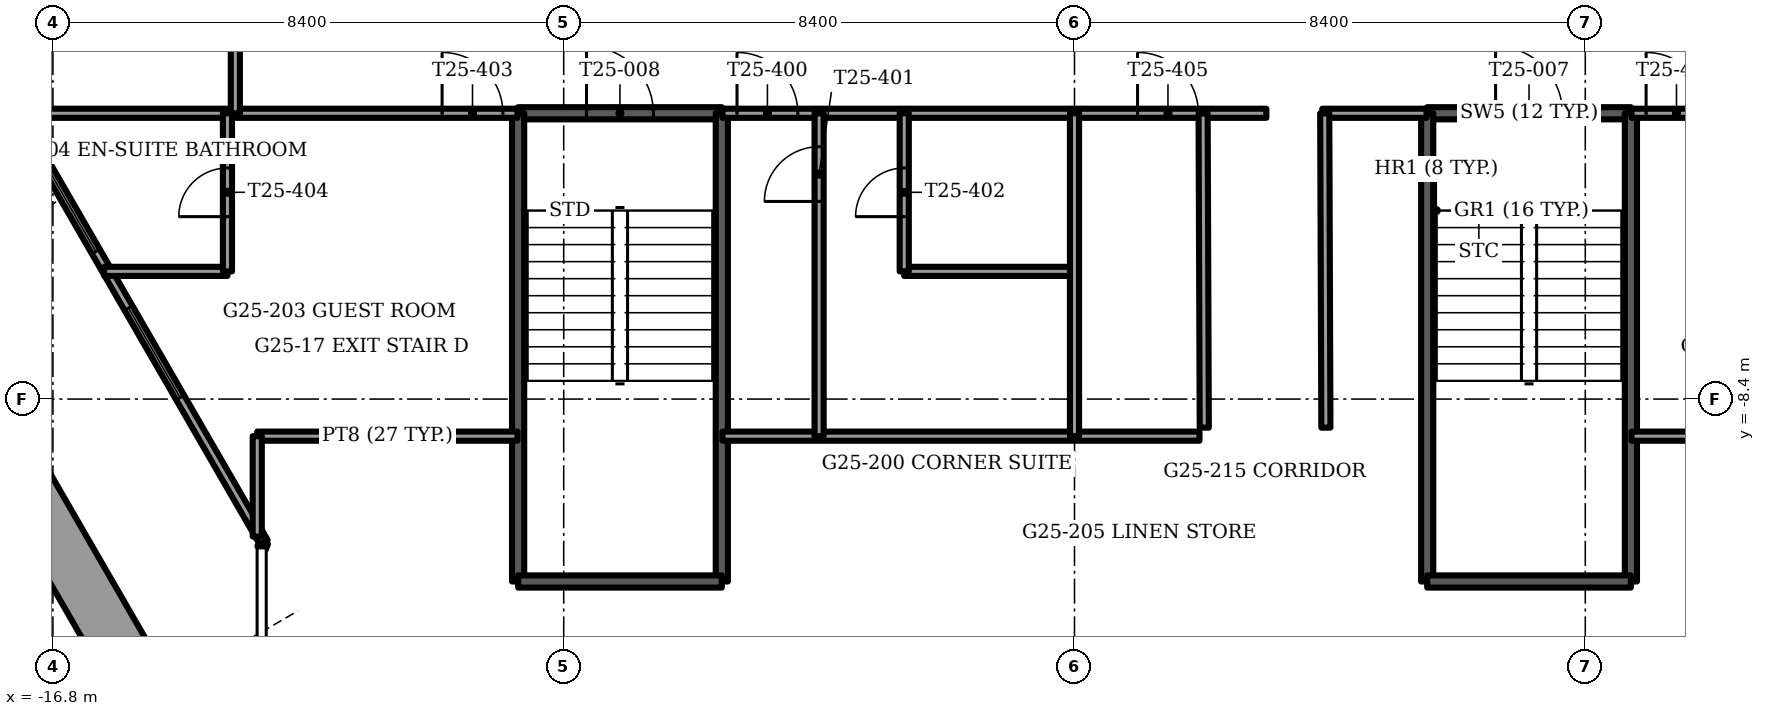
"""IFC4 building model, lengths in metres.
Left out: names, types, materials, properties, quantities, classifications, styles, units other than length and angle.
Written with IfcOpenShell. Run it as: python <this file> out.ifc"""

import sys

from ifc_helpers import new_model, si_unit, direction, frame, frame_2d, origin, place, context, subcontext, project, spatial, rectangle, extrude, element, fill, save


model = new_model("IFC4")
c1 = context("Model", 3, precision=1e-05, world=origin(), true_north=direction((0.0, 1.0)))
c2 = subcontext(c1, "Body", "Model", "MODEL_VIEW")
j1 = project(units=[si_unit("LENGTHUNIT", "METRE"), si_unit("PLANEANGLEUNIT", "RADIAN")], contexts=[c1])
p1 = place(None, origin())
s1 = spatial("IfcSite", under=j1, at=p1, CompositionType="ELEMENT")
p2 = place(p1, origin())
s2 = spatial("IfcBuilding", under=s1, at=p2, CompositionType="ELEMENT")
p3 = place(p2, frame((0.0, 0.0, 100.5)))
s3 = spatial("IfcBuildingStorey", under=s2, at=p3, CompositionType="ELEMENT", Elevation=100.5)
p4 = place(p3, frame((-18.859, -7.035, 0.0), z_axis=(0.0, 0.0, 1.0), x_axis=(0.499999023957, -0.866025967302, 0.0)))
e1 = element("IfcWall", 1, at=p4, inside=s3, PredefinedType="PARAPET", context=c2, shape_type="SweptSolid", body=[
    extrude(rectangle(XDim=6.673, YDim=0.9, at=frame_2d((3.337, 0.0))), origin(), (0.0, 0.0, 1.0), 1.1),
])
p5 = place(p3, frame((-19.047, -0.86, 0.0), z_axis=(0.0, 0.0, 1.0), x_axis=(0.499999897272, -0.866025463095, 0.0)))
e2 = element("IfcWall", 2, at=p5, inside=s3, PredefinedType="SOLIDWALL", context=c2, shape_type="SweptSolid", body=[
    extrude(rectangle(XDim=11.426, YDim=0.15, at=frame_2d((5.713, 0.0))), origin(), (0.0, 0.0, 1.0), 3.45),
])
p6 = place(p5, frame((4.406, 0.0, 0.15)))
e3 = element("IfcOpeningElement", 3, at=p6, cuts=e2, PredefinedType="OPENING", context=c2, shape_type="SweptSolid", body=[
    extrude(rectangle(XDim=1.5, YDim=2.2, at=frame_2d((0.75, 1.1))), frame((0.0, 0.075, 0.0), z_axis=(0.0, -1.0, 0.0), x_axis=(1.0, 0.0, 0.0)), (0.0, 0.0, 1.0), 0.15),
])
p7 = place(p5, frame((6.979, 0.0, 0.15)))
e4 = element("IfcOpeningElement", 4, at=p7, cuts=e2, PredefinedType="OPENING", context=c2, shape_type="SweptSolid", body=[
    extrude(rectangle(XDim=1.7, YDim=2.2, at=frame_2d((0.85, 1.1))), frame((0.0, 0.075, 0.0), z_axis=(0.0, -1.0, 0.0), x_axis=(1.0, 0.0, 0.0)), (0.0, 0.0, 1.0), 0.15),
])
p8 = place(p3, frame((-13.334, -10.755, 0.0), z_axis=(0.0, 0.0, 1.0), x_axis=(-0.337751931921, -0.941235163221, 0.0)))
e5 = element("IfcWall", 5, at=p8, inside=s3, PredefinedType="SOLIDWALL", context=c2, shape_type="SweptSolid", body=[
    extrude(rectangle(XDim=0.098, YDim=0.15, at=frame_2d((0.049, 0.0))), origin(), (0.0, 0.0, 1.0), 3.45),
])
p9 = place(p3, frame((5.8, -3.7, -0.3), z_axis=(0.0, 0.0, 1.0), x_axis=(1.0, 0.0, 0.0)))
e6 = element("IfcWall", 6, at=p9, inside=s3, PredefinedType="SOLIDWALL", context=c2, shape_type="SweptSolid", body=[
    extrude(rectangle(XDim=3.35, YDim=0.2, at=frame_2d((1.675, 0.0))), origin(), (0.0, 0.0, 1.0), 3.75),
])
p10 = place(p9, frame((1.125, 0.0, 0.0)))
e7 = element("IfcOpeningElement", 7, at=p10, cuts=e6, PredefinedType="OPENING", context=c2, shape_type="SweptSolid", body=[
    extrude(rectangle(XDim=1.1, YDim=2.1, at=frame_2d((0.55, 1.05))), frame((0.0, 0.1, 0.0), z_axis=(0.0, -1.0, 0.0), x_axis=(1.0, 0.0, 0.0)), (0.0, 0.0, 1.0), 0.2),
])
for number, where, z_axis, x_axis in (
    (8, (5.8, -3.7, -0.3), (0.0, 0.0, 1.0), (0.0, -1.0, 0.0)),
    (9, (9.15, -3.7, -0.3), (0.0, 0.0, 1.0), (0.0, -1.0, 0.0)),
):
    element("IfcWall", number, at=place(p3, frame(where, z_axis=z_axis, x_axis=x_axis)), inside=s3, PredefinedType="SOLIDWALL", context=c2, shape_type="SweptSolid", body=[
        extrude(rectangle(XDim=7.7, YDim=0.2, at=frame_2d((3.85, 0.0))), origin(), (0.0, 0.0, 1.0), 3.75),
    ])
p11 = place(p3, frame((5.8, -11.4, -0.3), z_axis=(0.0, 0.0, 1.0), x_axis=(1.0, 0.0, 0.0)))
e10 = element("IfcWall", 10, at=p11, inside=s3, PredefinedType="SOLIDWALL", context=c2, shape_type="SweptSolid", body=[
    extrude(rectangle(XDim=3.35, YDim=0.2, at=frame_2d((1.675, 0.0))), origin(), (0.0, 0.0, 1.0), 3.75),
])
p12 = place(p3, frame((-9.15, -3.7, -0.3), z_axis=(0.0, 0.0, 1.0), x_axis=(1.0, 0.0, 0.0)))
e11 = element("IfcWall", 11, at=p12, inside=s3, PredefinedType="SOLIDWALL", context=c2, shape_type="SweptSolid", body=[
    extrude(rectangle(XDim=3.35, YDim=0.2, at=frame_2d((1.675, 0.0))), origin(), (0.0, 0.0, 1.0), 3.75),
])
p13 = place(p12, frame((1.125, 0.0, 0.0)))
e12 = element("IfcOpeningElement", 12, at=p13, cuts=e11, PredefinedType="OPENING", context=c2, shape_type="SweptSolid", body=[
    extrude(rectangle(XDim=1.1, YDim=2.1, at=frame_2d((0.55, 1.05))), frame((0.0, 0.1, 0.0), z_axis=(0.0, -1.0, 0.0), x_axis=(1.0, 0.0, 0.0)), (0.0, 0.0, 1.0), 0.2),
])
for number, where, z_axis, x_axis in (
    (13, (-9.15, -3.7, -0.3), (0.0, 0.0, 1.0), (0.0, -1.0, 0.0)),
    (14, (-5.8, -3.7, -0.3), (0.0, 0.0, 1.0), (0.0, -1.0, 0.0)),
):
    element("IfcWall", number, at=place(p3, frame(where, z_axis=z_axis, x_axis=x_axis)), inside=s3, PredefinedType="SOLIDWALL", context=c2, shape_type="SweptSolid", body=[
        extrude(rectangle(XDim=7.7, YDim=0.2, at=frame_2d((3.85, 0.0))), origin(), (0.0, 0.0, 1.0), 3.75),
    ])
p14 = place(p3, frame((-9.15, -11.4, -0.3), z_axis=(0.0, 0.0, 1.0), x_axis=(1.0, 0.0, 0.0)))
e15 = element("IfcWall", 15, at=p14, inside=s3, PredefinedType="SOLIDWALL", context=c2, shape_type="SweptSolid", body=[
    extrude(rectangle(XDim=3.35, YDim=0.2, at=frame_2d((1.675, 0.0))), origin(), (0.0, 0.0, 1.0), 3.75),
])
p15 = place(p3, frame((-13.44, -9.01, 0.0), z_axis=(0.0, 0.0, 1.0), x_axis=(1.0, 0.0, 0.0)))
e16 = element("IfcWall", 16, at=p15, inside=s3, PredefinedType="PARTITIONING", context=c2, shape_type="SweptSolid", body=[
    extrude(rectangle(XDim=4.28, YDim=0.15, at=frame_2d((2.14, 0.0))), origin(), (0.0, 0.0, 1.0), 3.45),
])
p16 = place(p3, frame((-5.79, -9.01, 0.0), z_axis=(0.0, 0.0, 1.0), x_axis=(1.0, 0.0, 0.0)))
e17 = element("IfcWall", 17, at=p16, inside=s3, PredefinedType="PARTITIONING", context=c2, shape_type="SweptSolid", body=[
    extrude(rectangle(XDim=7.845, YDim=0.15, at=frame_2d((3.922, 0.0))), origin(), (0.0, 0.0, 1.0), 3.45),
])
p17 = place(p3, frame((9.16, -9.01, 0.0), z_axis=(0.0, 0.0, 1.0), x_axis=(1.0, 0.0, 0.0)))
e18 = element("IfcWall", 18, at=p17, inside=s3, PredefinedType="PARTITIONING", context=c2, shape_type="SweptSolid", body=[
    extrude(rectangle(XDim=4.28, YDim=0.15, at=frame_2d((2.14, 0.0))), origin(), (0.0, 0.0, 1.0), 3.45),
])
p18 = place(p3, frame((-15.958, -6.3, 0.0), z_axis=(0.0, 0.0, 1.0), x_axis=(1.0, 0.0, 0.0)))
e19 = element("IfcWall", 19, at=p18, inside=s3, PredefinedType="PARTITIONING", context=c2, shape_type="SweptSolid", body=[
    extrude(rectangle(XDim=2.028, YDim=0.15, at=frame_2d((1.014, 0.0))), origin(), (0.0, 0.0, 1.0), 3.45),
])
p19 = place(p3, frame((-2.8, -6.3, 0.0), z_axis=(0.0, 0.0, 1.0), x_axis=(1.0, 0.0, 0.0)))
e20 = element("IfcWall", 20, at=p19, inside=s3, PredefinedType="PARTITIONING", context=c2, shape_type="SweptSolid", body=[
    extrude(rectangle(XDim=2.8, YDim=0.15, at=frame_2d((1.4, 0.0))), origin(), (0.0, 0.0, 1.0), 3.45),
])
p20 = place(p3, frame((-17.459, -3.7, 0.0), z_axis=(0.0, 0.0, 1.0), x_axis=(1.0, 0.0, 0.0)))
e21 = element("IfcWall", 21, at=p20, inside=s3, PredefinedType="PARTITIONING", context=c2, shape_type="SweptSolid", body=[
    extrude(rectangle(XDim=8.299, YDim=0.15, at=frame_2d((4.149, 0.0))), origin(), (0.0, 0.0, 1.0), 3.45),
])
p21 = place(p20, frame((7.059, 0.0, 0.0)))
e22 = element("IfcOpeningElement", 22, at=p21, cuts=e21, PredefinedType="OPENING", context=c2, shape_type="SweptSolid", body=[
    extrude(rectangle(XDim=1.0, YDim=2.1, at=frame_2d((0.5, 1.05))), frame((0.0, 0.075, 0.0), z_axis=(0.0, -1.0, 0.0), x_axis=(1.0, 0.0, 0.0)), (0.0, 0.0, 1.0), 0.15),
])
p22 = place(p3, frame((-5.79, -3.7, 0.0), z_axis=(0.0, 0.0, 1.0), x_axis=(1.0, 0.0, 0.0)))
e23 = element("IfcWall", 23, at=p22, inside=s3, PredefinedType="PARTITIONING", context=c2, shape_type="SweptSolid", body=[
    extrude(rectangle(XDim=8.945, YDim=0.15, at=frame_2d((4.473, 0.0))), origin(), (0.0, 0.0, 1.0), 3.45),
])
p23 = place(p22, frame((0.24, 0.0, 0.0)))
e24 = element("IfcOpeningElement", 24, at=p23, cuts=e23, PredefinedType="OPENING", context=c2, shape_type="SweptSolid", body=[
    extrude(rectangle(XDim=1.0, YDim=2.1, at=frame_2d((0.5, 1.05))), frame((0.0, 0.075, 0.0), z_axis=(0.0, -1.0, 0.0), x_axis=(1.0, 0.0, 0.0)), (0.0, 0.0, 1.0), 0.15),
])
p24 = place(p22, frame((6.827, 0.0, 0.0)))
e25 = element("IfcOpeningElement", 25, at=p24, cuts=e23, PredefinedType="OPENING", context=c2, shape_type="SweptSolid", body=[
    extrude(rectangle(XDim=1.0, YDim=2.1, at=frame_2d((0.5, 1.05))), frame((0.0, 0.075, 0.0), z_axis=(0.0, -1.0, 0.0), x_axis=(1.0, 0.0, 0.0)), (0.0, 0.0, 1.0), 0.15),
])
p25 = place(p3, frame((4.075, -3.7, 0.0), z_axis=(0.0, 0.0, 1.0), x_axis=(1.0, 0.0, 0.0)))
e26 = element("IfcWall", 26, at=p25, inside=s3, PredefinedType="PARTITIONING", context=c2, shape_type="SweptSolid", body=[
    extrude(rectangle(XDim=1.715, YDim=0.15, at=frame_2d((0.857, 0.0))), origin(), (0.0, 0.0, 1.0), 3.45),
])
p26 = place(p3, frame((9.16, -3.7, 0.0), z_axis=(0.0, 0.0, 1.0), x_axis=(1.0, 0.0, 0.0)))
e27 = element("IfcWall", 27, at=p26, inside=s3, PredefinedType="PARTITIONING", context=c2, shape_type="SweptSolid", body=[
    extrude(rectangle(XDim=8.299, YDim=0.15, at=frame_2d((4.149, 0.0))), origin(), (0.0, 0.0, 1.0), 3.45),
])
p27 = place(p26, frame((0.24, 0.0, 0.0)))
e28 = element("IfcOpeningElement", 28, at=p27, cuts=e27, PredefinedType="OPENING", context=c2, shape_type="SweptSolid", body=[
    extrude(rectangle(XDim=1.0, YDim=2.1, at=frame_2d((0.5, 1.05))), frame((0.0, 0.075, 0.0), z_axis=(0.0, -1.0, 0.0), x_axis=(1.0, 0.0, 0.0)), (0.0, 0.0, 1.0), 0.15),
])
p28 = place(p3, frame((0.0, -9.01, 0.0), z_axis=(0.0, 0.0, 1.0), x_axis=(0.0, 1.0, 0.0)))
e29 = element("IfcWall", 29, at=p28, inside=s3, PredefinedType="PARTITIONING", context=c2, shape_type="SweptSolid", body=[
    extrude(rectangle(XDim=5.31, YDim=0.15, at=frame_2d((2.655, 0.0))), origin(), (0.0, 0.0, 1.0), 3.45),
])
p29 = place(p3, frame((-2.8, -6.3, 0.0), z_axis=(0.0, 0.0, 1.0), x_axis=(0.0, 1.0, 0.0)))
e30 = element("IfcWall", 30, at=p29, inside=s3, PredefinedType="PARTITIONING", context=c2, shape_type="SweptSolid", body=[
    extrude(rectangle(XDim=2.6, YDim=0.15, at=frame_2d((1.3, 0.0))), origin(), (0.0, 0.0, 1.0), 3.45),
])
p30 = place(p29, frame((0.9, 0.0, 0.0)))
e31 = element("IfcOpeningElement", 31, at=p30, cuts=e30, PredefinedType="OPENING", context=c2, shape_type="SweptSolid", body=[
    extrude(rectangle(XDim=0.8, YDim=2.1, at=frame_2d((0.4, 1.05))), frame((0.0, 0.075, 0.0), z_axis=(0.0, -1.0, 0.0), x_axis=(1.0, 0.0, 0.0)), (0.0, 0.0, 1.0), 0.15),
])
p31 = place(p3, frame((-4.2, -9.01, 0.0), z_axis=(0.0, 0.0, 1.0), x_axis=(0.0, 1.0, 0.0)))
e32 = element("IfcWall", 32, at=p31, inside=s3, PredefinedType="PARTITIONING", context=c2, shape_type="SweptSolid", body=[
    extrude(rectangle(XDim=5.31, YDim=0.15, at=frame_2d((2.655, 0.0))), origin(), (0.0, 0.0, 1.0), 3.45),
])
p32 = place(p31, frame((3.86, 0.0, 0.0)))
e33 = element("IfcOpeningElement", 33, at=p32, cuts=e32, PredefinedType="OPENING", context=c2, shape_type="SweptSolid", body=[
    extrude(rectangle(XDim=0.9, YDim=2.1, at=frame_2d((0.45, 1.05))), frame((0.0, 0.075, 0.0), z_axis=(0.0, -1.0, 0.0), x_axis=(1.0, 0.0, 0.0)), (0.0, 0.0, 1.0), 0.15),
])
p33 = place(p3, frame((-13.44, -10.661, 0.0), z_axis=(0.0, 0.0, 1.0), x_axis=(0.0, 1.0, 0.0)))
e34 = element("IfcWall", 34, at=p33, inside=s3, PredefinedType="PARTITIONING", context=c2, shape_type="SweptSolid", body=[
    extrude(rectangle(XDim=1.651, YDim=0.15, at=frame_2d((0.825, 0.0))), origin(), (0.0, 0.0, 1.0), 3.45),
])
p34 = place(p3, frame((-13.8, -3.7, 0.0), z_axis=(0.0, 0.0, 1.0), x_axis=(0.0, 1.0, 0.0)))
e35 = element("IfcWall", 35, at=p34, inside=s3, PredefinedType="PARTITIONING", context=c2, shape_type="SweptSolid", body=[
    extrude(rectangle(XDim=13.083, YDim=0.15, at=frame_2d((6.542, 0.0))), origin(), (0.0, 0.0, 1.0), 3.45),
])
p35 = place(p34, frame((2.65, 0.0, 0.0)))
e36 = element("IfcOpeningElement", 36, at=p35, cuts=e35, PredefinedType="OPENING", context=c2, shape_type="SweptSolid", body=[
    extrude(rectangle(XDim=1.0, YDim=2.1, at=frame_2d((0.5, 1.05))), frame((0.0, 0.075, 0.0), z_axis=(0.0, -1.0, 0.0), x_axis=(1.0, 0.0, 0.0)), (0.0, 0.0, 1.0), 0.15),
])
p36 = place(p34, frame((9.07, 0.0, 0.0)))
e37 = element("IfcOpeningElement", 37, at=p36, cuts=e35, PredefinedType="OPENING", context=c2, shape_type="SweptSolid", body=[
    extrude(rectangle(XDim=1.0, YDim=2.1, at=frame_2d((0.5, 1.05))), frame((0.0, 0.075, 0.0), z_axis=(0.0, -1.0, 0.0), x_axis=(1.0, 0.0, 0.0)), (0.0, 0.0, 1.0), 0.15),
])
p37 = place(p3, frame((-13.93, -6.3, 0.0), z_axis=(0.0, 0.0, 1.0), x_axis=(0.0, 1.0, 0.0)))
e38 = element("IfcWall", 38, at=p37, inside=s3, PredefinedType="PARTITIONING", context=c2, shape_type="SweptSolid", body=[
    extrude(rectangle(XDim=2.6, YDim=0.15, at=frame_2d((1.3, 0.0))), origin(), (0.0, 0.0, 1.0), 3.45),
])
p38 = place(p37, frame((0.9, 0.0, 0.0)))
e39 = element("IfcOpeningElement", 39, at=p38, cuts=e38, PredefinedType="OPENING", context=c2, shape_type="SweptSolid", body=[
    extrude(rectangle(XDim=0.8, YDim=2.1, at=frame_2d((0.4, 1.05))), frame((0.0, 0.075, 0.0), z_axis=(0.0, -1.0, 0.0), x_axis=(1.0, 0.0, 0.0)), (0.0, 0.0, 1.0), 0.15),
])
p39 = place(p3, frame((4.134, -8.87, 0.0), z_axis=(0.0, 0.0, 1.0), x_axis=(-0.003683216269, 0.999993216936, 0.0)))
e40 = element("IfcWall", 40, at=p39, inside=s3, PredefinedType="PARTITIONING", context=c2, shape_type="SweptSolid", body=[
    extrude(rectangle(XDim=5.17, YDim=0.15, at=frame_2d((2.585, 0.0))), origin(), (0.0, 0.0, 1.0), 3.45),
])
p40 = place(p3, frame((2.134, -8.87, 0.0), z_axis=(0.0, 0.0, 1.0), x_axis=(-0.003686872276, 0.999993203463, 0.0)))
e41 = element("IfcWall", 41, at=p40, inside=s3, PredefinedType="PARTITIONING", context=c2, shape_type="SweptSolid", body=[
    extrude(rectangle(XDim=5.165, YDim=0.15, at=frame_2d((2.583, 0.0))), origin(), (0.0, 0.0, 1.0), 3.45),
])
p41 = place(p6, origin())
e42 = element("IfcWindow", 42, at=p41, inside=s3, PartitioningType="SINGLE_PANEL", PredefinedType="WINDOW", context=c2, shape_type="SweptSolid", body=[
    extrude(rectangle(XDim=1.5, YDim=2.2, at=frame_2d((0.75, 1.1))), frame((0.0, 0.03, 0.0), z_axis=(0.0, -1.0, 0.0), x_axis=(1.0, 0.0, 0.0)), (0.0, 0.0, 1.0), 0.06),
])
fill(e3, e42)
p42 = place(p7, origin())
e43 = element("IfcWindow", 43, at=p42, inside=s3, PartitioningType="SINGLE_PANEL", PredefinedType="WINDOW", context=c2, shape_type="SweptSolid", body=[
    extrude(rectangle(XDim=1.7, YDim=2.2, at=frame_2d((0.85, 1.1))), frame((0.0, 0.03, 0.0), z_axis=(0.0, -1.0, 0.0), x_axis=(1.0, 0.0, 0.0)), (0.0, 0.0, 1.0), 0.06),
])
fill(e4, e43)
p43 = place(p10, origin())
e44 = element("IfcDoor", 44, at=p43, inside=s3, OperationType="SINGLE_SWING_LEFT", PredefinedType="DOOR", context=c2, shape_type="SweptSolid", body=[
    extrude(rectangle(XDim=1.1, YDim=2.1, at=frame_2d((0.55, 1.05))), frame((0.0, 0.025, 0.0), z_axis=(0.0, -1.0, 0.0), x_axis=(1.0, 0.0, 0.0)), (0.0, 0.0, 1.0), 0.05),
])
fill(e7, e44)
p44 = place(p13, origin())
e45 = element("IfcDoor", 45, at=p44, inside=s3, OperationType="SINGLE_SWING_LEFT", PredefinedType="DOOR", context=c2, shape_type="SweptSolid", body=[
    extrude(rectangle(XDim=1.1, YDim=2.1, at=frame_2d((0.55, 1.05))), frame((0.0, 0.025, 0.0), z_axis=(0.0, -1.0, 0.0), x_axis=(1.0, 0.0, 0.0)), (0.0, 0.0, 1.0), 0.05),
])
fill(e12, e45)
p45 = place(p23, origin())
e46 = element("IfcDoor", 46, at=p45, inside=s3, OperationType="SINGLE_SWING_LEFT", PredefinedType="DOOR", context=c2, shape_type="SweptSolid", body=[
    extrude(rectangle(XDim=1.0, YDim=2.1, at=frame_2d((0.5, 1.05))), frame((0.0, 0.025, 0.0), z_axis=(0.0, -1.0, 0.0), x_axis=(1.0, 0.0, 0.0)), (0.0, 0.0, 1.0), 0.05),
])
fill(e24, e46)
p46 = place(p32, origin())
e47 = element("IfcDoor", 47, at=p46, inside=s3, OperationType="SINGLE_SWING_RIGHT", PredefinedType="DOOR", context=c2, shape_type="SweptSolid", body=[
    extrude(rectangle(XDim=0.9, YDim=2.1, at=frame_2d((0.45, 1.05))), frame((0.0, 0.025, 0.0), z_axis=(0.0, -1.0, 0.0), x_axis=(1.0, 0.0, 0.0)), (0.0, 0.0, 1.0), 0.05),
])
fill(e33, e47)
p47 = place(p30, origin())
e48 = element("IfcDoor", 48, at=p47, inside=s3, OperationType="SINGLE_SWING_RIGHT", PredefinedType="DOOR", context=c2, shape_type="SweptSolid", body=[
    extrude(rectangle(XDim=0.8, YDim=2.1, at=frame_2d((0.4, 1.05))), frame((0.0, 0.025, 0.0), z_axis=(0.0, -1.0, 0.0), x_axis=(1.0, 0.0, 0.0)), (0.0, 0.0, 1.0), 0.05),
])
fill(e31, e48)
p48 = place(p21, origin())
e49 = element("IfcDoor", 49, at=p48, inside=s3, OperationType="SINGLE_SWING_RIGHT", PredefinedType="DOOR", context=c2, shape_type="SweptSolid", body=[
    extrude(rectangle(XDim=1.0, YDim=2.1, at=frame_2d((0.5, 1.05))), frame((0.0, 0.025, 0.0), z_axis=(0.0, -1.0, 0.0), x_axis=(1.0, 0.0, 0.0)), (0.0, 0.0, 1.0), 0.05),
])
fill(e22, e49)
p49 = place(p38, origin())
e50 = element("IfcDoor", 50, at=p49, inside=s3, OperationType="SINGLE_SWING_RIGHT", PredefinedType="DOOR", context=c2, shape_type="SweptSolid", body=[
    extrude(rectangle(XDim=0.8, YDim=2.1, at=frame_2d((0.4, 1.05))), frame((0.0, 0.025, 0.0), z_axis=(0.0, -1.0, 0.0), x_axis=(1.0, 0.0, 0.0)), (0.0, 0.0, 1.0), 0.05),
])
fill(e39, e50)
p50 = place(p24, origin())
e51 = element("IfcDoor", 51, at=p50, inside=s3, OperationType="SINGLE_SWING_LEFT", PredefinedType="DOOR", context=c2, shape_type="SweptSolid", body=[
    extrude(rectangle(XDim=1.0, YDim=2.1, at=frame_2d((0.5, 1.05))), frame((0.0, 0.025, 0.0), z_axis=(0.0, -1.0, 0.0), x_axis=(1.0, 0.0, 0.0)), (0.0, 0.0, 1.0), 0.05),
])
fill(e25, e51)
p51 = place(p27, origin())
e52 = element("IfcDoor", 52, at=p51, inside=s3, OperationType="SINGLE_SWING_LEFT", PredefinedType="DOOR", context=c2, shape_type="SweptSolid", body=[
    extrude(rectangle(XDim=1.0, YDim=2.1, at=frame_2d((0.5, 1.05))), frame((0.0, 0.025, 0.0), z_axis=(0.0, -1.0, 0.0), x_axis=(1.0, 0.0, 0.0)), (0.0, 0.0, 1.0), 0.05),
])
fill(e28, e52)
save(model, sys.argv[1])
